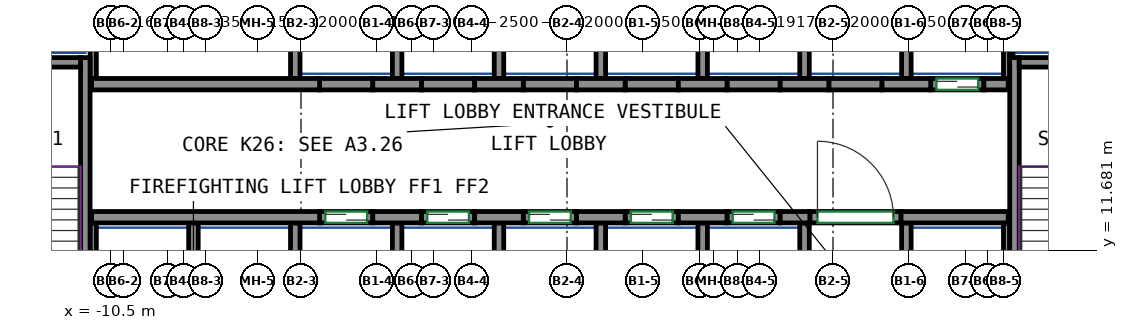
"""IFC4 building model, lengths in metres.
Left out: names, types, materials, properties, quantities, classifications, styles, units other than length and angle.
Written with IfcOpenShell. Run it as: python <this file> out.ifc"""

import sys

from ifc_helpers import new_model, si_unit, direction, frame, frame_2d, origin, place, context, subcontext, project, spatial, rectangle, extrude, source, transform, mapped, element, fill, save


model = new_model("IFC4")
c1 = context("Model", 3, precision=1e-05, world=origin(), true_north=direction((0.0, 1.0)))
c2 = subcontext(c1, "Body", "Model", "MODEL_VIEW")
j1 = project(units=[si_unit("LENGTHUNIT", "METRE"), si_unit("PLANEANGLEUNIT", "RADIAN")], contexts=[c1])
p1 = place(None, origin())
s1 = spatial("IfcSite", under=j1, at=p1, CompositionType="ELEMENT")
p2 = place(p1, origin())
s2 = spatial("IfcBuilding", under=s1, at=p2, CompositionType="ELEMENT")
p3 = place(p2, frame((0.0, 0.0, 108.6)))
s3 = spatial("IfcBuildingStorey", under=s2, at=p3, CompositionType="ELEMENT", Elevation=108.6)
m1 = source(origin(), c2, "Body", "SweptSolid", [
    extrude(rectangle(XDim=7.75, YDim=0.25, at=frame_2d((3.875, 0.0))), origin(), (0.0, 0.0, 1.0), 3.72),
])
p4 = place(p3, frame((-11.175, 9.0, 0.0), z_axis=(0.0, 0.0, 1.0), x_axis=(0.0, 1.0, 0.0)))
e1 = element("IfcWall", 1, at=p4, inside=s3, PredefinedType="SHEAR", context=c2, shape_type="MappedRepresentation", body=[
    mapped(m1, transform((0.0, 0.0, 0.0))),
])
m2 = source(origin(), c2, "Body", "SweptSolid", [
    extrude(rectangle(XDim=3.7, YDim=0.25, at=frame_2d((1.85, 0.0))), origin(), (0.0, 0.0, 1.0), 3.72),
])
p5 = place(p3, frame((-15.0, 16.625, 0.0), z_axis=(0.0, 0.0, 1.0), x_axis=(1.0, 0.0, 0.0)))
e2 = element("IfcWall", 2, at=p5, inside=s3, PredefinedType="SHEAR", context=c2, shape_type="MappedRepresentation", body=[
    mapped(m2, transform((0.0, 0.0, 0.0))),
])
p6 = place(p3, frame((13.275, 9.0, 0.0), z_axis=(0.0, 0.0, 1.0), x_axis=(0.0, 1.0, 0.0)))
e3 = element("IfcWall", 3, at=p6, inside=s3, PredefinedType="SHEAR", context=c2, shape_type="MappedRepresentation", body=[
    mapped(m1, transform((0.0, 0.0, 0.0))),
])
m3 = source(origin(), c2, "Body", "SweptSolid", [
    extrude(rectangle(XDim=3.7, YDim=0.25, at=frame_2d((1.85, 0.0))), origin(), (0.0, 0.0, 1.0), 3.72),
])
p7 = place(p3, frame((13.4, 16.625, 0.0), z_axis=(0.0, 0.0, 1.0), x_axis=(1.0, 0.0, 0.0)))
e4 = element("IfcWall", 4, at=p7, inside=s3, PredefinedType="SHEAR", context=c2, shape_type="MappedRepresentation", body=[
    mapped(m3, transform((0.0, 0.0, 0.0))),
])
m4 = source(origin(), c2, "Body", "SweptSolid", [
    extrude(rectangle(XDim=6.0, YDim=0.3, at=frame_2d((3.0, 0.0))), origin(), (0.0, 0.0, 1.0), 3.72),
])
p8 = place(p3, frame((-11.01, 12.55, 0.0), z_axis=(0.0, 0.0, 1.0), x_axis=(1.0, 0.0, 0.0)))
e5 = element("IfcWall", 5, at=p8, inside=s3, PredefinedType="SHEAR", context=c2, shape_type="MappedRepresentation", body=[
    mapped(m4, transform((0.0, 0.0, 0.0))),
])
m5 = source(origin(), c2, "Body", "SweptSolid", [
    extrude(rectangle(XDim=1.28, YDim=0.3, at=frame_2d((0.64, 0.0))), origin(), (0.0, 0.0, 1.0), 3.72),
])
for number, where, z_axis, x_axis in (
    (6, (-3.61, 12.55, 0.0), (0.0, 0.0, 1.0), (1.0, 0.0, 0.0)),
    (7, (-0.93, 12.55, 0.0), (0.0, 0.0, 1.0), (1.0, 0.0, 0.0)),
    (8, (1.75, 12.55, 0.0), (0.0, 0.0, 1.0), (1.0, 0.0, 0.0)),
    (9, (4.43, 12.55, 0.0), (0.0, 0.0, 1.0), (1.0, 0.0, 0.0)),
):
    element("IfcWall", number, at=place(p3, frame(where, z_axis=z_axis, x_axis=x_axis)), inside=s3, PredefinedType="SHEAR", context=c2, shape_type="MappedRepresentation", body=[
        mapped(m5, transform((0.0, 0.0, 0.0))),
    ])
m6 = source(origin(), c2, "Body", "SweptSolid", [
    extrude(rectangle(XDim=0.78, YDim=0.3, at=frame_2d((0.39, 0.0))), origin(), (0.0, 0.0, 1.0), 3.72),
])
p9 = place(p3, frame((7.11, 12.55, 0.0), z_axis=(0.0, 0.0, 1.0), x_axis=(1.0, 0.0, 0.0)))
e10 = element("IfcWall", 10, at=p9, inside=s3, PredefinedType="SHEAR", context=c2, shape_type="MappedRepresentation", body=[
    mapped(m6, transform((0.0, 0.0, 0.0))),
])
m7 = source(origin(), c2, "Body", "SweptSolid", [
    extrude(rectangle(XDim=2.82, YDim=0.3, at=frame_2d((1.41, 0.0))), origin(), (0.0, 0.0, 1.0), 3.72),
])
p10 = place(p3, frame((10.29, 12.55, 0.0), z_axis=(0.0, 0.0, 1.0), x_axis=(1.0, 0.0, 0.0)))
e11 = element("IfcWall", 11, at=p10, inside=s3, PredefinedType="SHEAR", context=c2, shape_type="MappedRepresentation", body=[
    mapped(m7, transform((0.0, 0.0, 0.0))),
])
p11 = place(p3, frame((-11.01, 16.05, 0.0), z_axis=(0.0, 0.0, 1.0), x_axis=(1.0, 0.0, 0.0)))
e12 = element("IfcWall", 12, at=p11, inside=s3, PredefinedType="SHEAR", context=c2, shape_type="MappedRepresentation", body=[
    mapped(m4, transform((0.0, 0.0, 0.0))),
])
for number, where, z_axis, x_axis in (
    (13, (-3.61, 16.05, 0.0), (0.0, 0.0, 1.0), (1.0, 0.0, 0.0)),
    (14, (-0.93, 16.05, 0.0), (0.0, 0.0, 1.0), (1.0, 0.0, 0.0)),
    (15, (1.75, 16.05, 0.0), (0.0, 0.0, 1.0), (1.0, 0.0, 0.0)),
    (16, (4.43, 16.05, 0.0), (0.0, 0.0, 1.0), (1.0, 0.0, 0.0)),
):
    element("IfcWall", number, at=place(p3, frame(where, z_axis=z_axis, x_axis=x_axis)), inside=s3, PredefinedType="SHEAR", context=c2, shape_type="MappedRepresentation", body=[
        mapped(m5, transform((0.0, 0.0, 0.0))),
    ])
m8 = source(origin(), c2, "Body", "SweptSolid", [
    extrude(rectangle(XDim=1.28, YDim=0.3, at=frame_2d((0.64, 0.0))), origin(), (0.0, 0.0, 1.0), 3.72),
])
p12 = place(p3, frame((7.11, 16.05, 0.0), z_axis=(0.0, 0.0, 1.0), x_axis=(1.0, 0.0, 0.0)))
e17 = element("IfcWall", 17, at=p12, inside=s3, PredefinedType="SHEAR", context=c2, shape_type="MappedRepresentation", body=[
    mapped(m8, transform((0.0, 0.0, 0.0))),
])
p13 = place(p3, frame((9.79, 16.05, 0.0), z_axis=(0.0, 0.0, 1.0), x_axis=(1.0, 0.0, 0.0)))
e18 = element("IfcWall", 18, at=p13, inside=s3, PredefinedType="SHEAR", context=c2, shape_type="MappedRepresentation", body=[
    mapped(m5, transform((0.0, 0.0, 0.0))),
])
m9 = source(origin(), c2, "Body", "SweptSolid", [
    extrude(rectangle(XDim=0.64, YDim=0.3, at=frame_2d((0.32, 0.0))), origin(), (0.0, 0.0, 1.0), 3.72),
])
p14 = place(p3, frame((12.47, 16.05, 0.0), z_axis=(0.0, 0.0, 1.0), x_axis=(1.0, 0.0, 0.0)))
e19 = element("IfcWall", 19, at=p14, inside=s3, PredefinedType="SHEAR", context=c2, shape_type="MappedRepresentation", body=[
    mapped(m9, transform((0.0, 0.0, 0.0))),
])
m10 = source(origin(), c2, "Body", "SweptSolid", [
    extrude(rectangle(XDim=1.4, YDim=0.3, at=frame_2d((0.7, 0.0))), origin(), (0.0, 0.0, 1.0), 3.72),
])
p15 = place(p3, frame((-5.01, 12.55, 0.0), z_axis=(0.0, 0.0, 1.0), x_axis=(1.0, 0.0, 0.0)))
e20 = element("IfcWall", 20, at=p15, inside=s3, PredefinedType="PARTITIONING", context=c2, shape_type="MappedRepresentation", body=[
    mapped(m10, transform((0.0, 0.0, 0.0))),
])
p16 = place(p15, frame((0.15, 0.0, 0.0)))
e21 = element("IfcOpeningElement", 21, at=p16, cuts=e20, PredefinedType="OPENING", context=c2, shape_type="SweptSolid", body=[
    extrude(rectangle(XDim=1.1, YDim=2.1, at=frame_2d((0.55, 1.05))), frame((0.0, 0.16, 0.0), z_axis=(0.0, -1.0, 0.0), x_axis=(1.0, 0.0, 0.0)), (0.0, 0.0, 1.0), 0.32),
])
m11 = source(origin(), c2, "Body", "SweptSolid", [
    extrude(rectangle(XDim=1.4, YDim=0.3, at=frame_2d((0.7, 0.0))), origin(), (0.0, 0.0, 1.0), 3.72),
])
p17 = place(p3, frame((-2.33, 12.55, 0.0), z_axis=(0.0, 0.0, 1.0), x_axis=(1.0, 0.0, 0.0)))
e22 = element("IfcWall", 22, at=p17, inside=s3, PredefinedType="PARTITIONING", context=c2, shape_type="MappedRepresentation", body=[
    mapped(m11, transform((0.0, 0.0, 0.0))),
])
p18 = place(p17, frame((0.15, 0.0, 0.0)))
e23 = element("IfcOpeningElement", 23, at=p18, cuts=e22, PredefinedType="OPENING", context=c2, shape_type="SweptSolid", body=[
    extrude(rectangle(XDim=1.1, YDim=2.1, at=frame_2d((0.55, 1.05))), frame((0.0, 0.16, 0.0), z_axis=(0.0, -1.0, 0.0), x_axis=(1.0, 0.0, 0.0)), (0.0, 0.0, 1.0), 0.32),
])
p19 = place(p3, frame((0.35, 12.55, 0.0), z_axis=(0.0, 0.0, 1.0), x_axis=(1.0, 0.0, 0.0)))
e24 = element("IfcWall", 24, at=p19, inside=s3, PredefinedType="PARTITIONING", context=c2, shape_type="MappedRepresentation", body=[
    mapped(m10, transform((0.0, 0.0, 0.0))),
])
p20 = place(p19, frame((0.15, 0.0, 0.0)))
e25 = element("IfcOpeningElement", 25, at=p20, cuts=e24, PredefinedType="OPENING", context=c2, shape_type="SweptSolid", body=[
    extrude(rectangle(XDim=1.1, YDim=2.1, at=frame_2d((0.55, 1.05))), frame((0.0, 0.16, 0.0), z_axis=(0.0, -1.0, 0.0), x_axis=(1.0, 0.0, 0.0)), (0.0, 0.0, 1.0), 0.32),
])
p21 = place(p3, frame((3.03, 12.55, 0.0), z_axis=(0.0, 0.0, 1.0), x_axis=(1.0, 0.0, 0.0)))
e26 = element("IfcWall", 26, at=p21, inside=s3, PredefinedType="PARTITIONING", context=c2, shape_type="MappedRepresentation", body=[
    mapped(m10, transform((0.0, 0.0, 0.0))),
])
p22 = place(p21, frame((0.15, 0.0, 0.0)))
e27 = element("IfcOpeningElement", 27, at=p22, cuts=e26, PredefinedType="OPENING", context=c2, shape_type="SweptSolid", body=[
    extrude(rectangle(XDim=1.1, YDim=2.1, at=frame_2d((0.55, 1.05))), frame((0.0, 0.16, 0.0), z_axis=(0.0, -1.0, 0.0), x_axis=(1.0, 0.0, 0.0)), (0.0, 0.0, 1.0), 0.32),
])
p23 = place(p3, frame((5.71, 12.55, 0.0), z_axis=(0.0, 0.0, 1.0), x_axis=(1.0, 0.0, 0.0)))
e28 = element("IfcWall", 28, at=p23, inside=s3, PredefinedType="PARTITIONING", context=c2, shape_type="MappedRepresentation", body=[
    mapped(m11, transform((0.0, 0.0, 0.0))),
])
p24 = place(p23, frame((0.15, 0.0, 0.0)))
e29 = element("IfcOpeningElement", 29, at=p24, cuts=e28, PredefinedType="OPENING", context=c2, shape_type="SweptSolid", body=[
    extrude(rectangle(XDim=1.1, YDim=2.1, at=frame_2d((0.55, 1.05))), frame((0.0, 0.16, 0.0), z_axis=(0.0, -1.0, 0.0), x_axis=(1.0, 0.0, 0.0)), (0.0, 0.0, 1.0), 0.32),
])
p25 = place(p3, frame((11.07, 16.05, 0.0), z_axis=(0.0, 0.0, 1.0), x_axis=(1.0, 0.0, 0.0)))
e30 = element("IfcWall", 30, at=p25, inside=s3, PredefinedType="PARTITIONING", context=c2, shape_type="MappedRepresentation", body=[
    mapped(m10, transform((0.0, 0.0, 0.0))),
])
p26 = place(p25, frame((0.15, 0.0, 0.0)))
e31 = element("IfcOpeningElement", 31, at=p26, cuts=e30, PredefinedType="OPENING", context=c2, shape_type="SweptSolid", body=[
    extrude(rectangle(XDim=1.1, YDim=2.1, at=frame_2d((0.55, 1.05))), frame((0.0, 0.16, 0.0), z_axis=(0.0, -1.0, 0.0), x_axis=(1.0, 0.0, 0.0)), (0.0, 0.0, 1.0), 0.32),
])
m12 = source(origin(), c2, "Body", "SweptSolid", [
    extrude(rectangle(XDim=2.4, YDim=0.3, at=frame_2d((1.2, 0.0))), origin(), (0.0, 0.0, 1.0), 3.72),
])
p27 = place(p3, frame((7.89, 12.55, 0.0), z_axis=(0.0, 0.0, 1.0), x_axis=(1.0, 0.0, 0.0)))
e32 = element("IfcWall", 32, at=p27, inside=s3, PredefinedType="PARTITIONING", context=c2, shape_type="MappedRepresentation", body=[
    mapped(m12, transform((0.0, 0.0, 0.0))),
])
p28 = place(p27, frame((0.2, 0.0, 0.0)))
e33 = element("IfcOpeningElement", 33, at=p28, cuts=e32, PredefinedType="OPENING", context=c2, shape_type="SweptSolid", body=[
    extrude(rectangle(XDim=2.0, YDim=2.1, at=frame_2d((1.0, 1.05))), frame((0.0, 0.16, 0.0), z_axis=(0.0, -1.0, 0.0), x_axis=(1.0, 0.0, 0.0)), (0.0, 0.0, 1.0), 0.32),
])
p29 = place(p3, frame((-5.01, 16.05, 0.0), z_axis=(0.0, 0.0, 1.0), x_axis=(1.0, 0.0, 0.0)))
e34 = element("IfcWall", 34, at=p29, inside=s3, PredefinedType="PARTITIONING", context=c2, shape_type="MappedRepresentation", body=[
    mapped(m10, transform((0.0, 0.0, 0.0))),
])
p30 = place(p3, frame((-2.33, 16.05, 0.0), z_axis=(0.0, 0.0, 1.0), x_axis=(1.0, 0.0, 0.0)))
e35 = element("IfcWall", 35, at=p30, inside=s3, PredefinedType="PARTITIONING", context=c2, shape_type="MappedRepresentation", body=[
    mapped(m11, transform((0.0, 0.0, 0.0))),
])
for number, where, z_axis, x_axis in (
    (36, (0.35, 16.05, 0.0), (0.0, 0.0, 1.0), (1.0, 0.0, 0.0)),
    (37, (3.03, 16.05, 0.0), (0.0, 0.0, 1.0), (1.0, 0.0, 0.0)),
):
    element("IfcWall", number, at=place(p3, frame(where, z_axis=z_axis, x_axis=x_axis)), inside=s3, PredefinedType="PARTITIONING", context=c2, shape_type="MappedRepresentation", body=[
        mapped(m10, transform((0.0, 0.0, 0.0))),
    ])
for number, where, z_axis, x_axis in (
    (38, (5.71, 16.05, 0.0), (0.0, 0.0, 1.0), (1.0, 0.0, 0.0)),
    (39, (8.39, 16.05, 0.0), (0.0, 0.0, 1.0), (1.0, 0.0, 0.0)),
):
    element("IfcWall", number, at=place(p3, frame(where, z_axis=z_axis, x_axis=x_axis)), inside=s3, PredefinedType="PARTITIONING", context=c2, shape_type="MappedRepresentation", body=[
        mapped(m11, transform((0.0, 0.0, 0.0))),
    ])
m13 = source(origin(), c2, "Body", "SweptSolid", [
    extrude(rectangle(XDim=3.275, YDim=0.165, at=frame_2d((1.638, 0.0))), origin(), (0.0, 0.0, 1.0), 3.72),
])
p31 = place(p3, frame((13.067, 16.2, 0.0), z_axis=(0.0, 0.0, 1.0), x_axis=(0.0, 1.0, 0.0)))
e40 = element("IfcWall", 40, at=p31, inside=s3, PredefinedType="PARTITIONING", context=c2, shape_type="MappedRepresentation", body=[
    mapped(m13, transform((0.0, 0.0, 0.0))),
])
m14 = source(origin(), c2, "Body", "SweptSolid", [
    extrude(rectangle(XDim=4.8, YDim=0.165, at=frame_2d((2.4, 0.0))), origin(), (0.0, 0.0, 1.0), 3.72),
])
p32 = place(p3, frame((-10.968, 16.2, 0.0), z_axis=(0.0, 0.0, 1.0), x_axis=(0.0, 1.0, 0.0)))
e41 = element("IfcWall", 41, at=p32, inside=s3, PredefinedType="PARTITIONING", context=c2, shape_type="MappedRepresentation", body=[
    mapped(m14, transform((0.0, 0.0, 0.0))),
])
m15 = source(origin(), c2, "Body", "SweptSolid", [
    extrude(rectangle(XDim=3.275, YDim=0.25, at=frame_2d((1.638, 0.0))), origin(), (0.0, 0.0, 1.0), 3.72),
])
p33 = place(p3, frame((10.43, 16.2, 0.0), z_axis=(0.0, 0.0, 1.0), x_axis=(0.0, 1.0, 0.0)))
e42 = element("IfcWall", 42, at=p33, inside=s3, PredefinedType="PARTITIONING", context=c2, shape_type="MappedRepresentation", body=[
    mapped(m15, transform((0.0, 0.0, 0.0))),
])
m16 = source(origin(), c2, "Body", "SweptSolid", [
    extrude(rectangle(XDim=2.725, YDim=0.085, at=frame_2d((1.363, 0.0))), origin(), (0.0, 0.0, 1.0), 3.72),
])
p34 = place(p3, frame((13.192, 16.75, 0.0), z_axis=(0.0, 0.0, 1.0), x_axis=(0.0, 1.0, 0.0)))
e43 = element("IfcWall", 43, at=p34, inside=s3, PredefinedType="PARTITIONING", context=c2, shape_type="MappedRepresentation", body=[
    mapped(m16, transform((0.0, 0.0, 0.0))),
])
for number, where, z_axis, x_axis in (
    (44, (2.39, 16.2, 0.0), (0.0, 0.0, 1.0), (0.0, 1.0, 0.0)),
    (45, (5.07, 16.2, 0.0), (0.0, 0.0, 1.0), (0.0, 1.0, 0.0)),
    (46, (7.75, 16.2, 0.0), (0.0, 0.0, 1.0), (0.0, 1.0, 0.0)),
    (47, (-0.29, 16.2, 0.0), (0.0, 0.0, 1.0), (0.0, 1.0, 0.0)),
    (48, (-2.97, 16.2, 0.0), (0.0, 0.0, 1.0), (0.0, 1.0, 0.0)),
    (49, (-5.65, 16.2, 0.0), (0.0, 0.0, 1.0), (0.0, 1.0, 0.0)),
):
    element("IfcWall", number, at=place(p3, frame(where, z_axis=z_axis, x_axis=x_axis)), inside=s3, PredefinedType="PARTITIONING", context=c2, shape_type="MappedRepresentation", body=[
        mapped(m15, transform((0.0, 0.0, 0.0))),
    ])
m17 = source(origin(), c2, "Body", "SweptSolid", [
    extrude(rectangle(XDim=3.4, YDim=0.25, at=frame_2d((1.7, 0.0))), origin(), (0.0, 0.0, 1.0), 3.72),
])
p35 = place(p3, frame((10.43, 9.0, 0.0), z_axis=(0.0, 0.0, 1.0), x_axis=(0.0, 1.0, 0.0)))
e50 = element("IfcWall", 50, at=p35, inside=s3, PredefinedType="PARTITIONING", context=c2, shape_type="MappedRepresentation", body=[
    mapped(m17, transform((0.0, 0.0, 0.0))),
])
m18 = source(origin(), c2, "Body", "SweptSolid", [
    extrude(rectangle(XDim=3.4, YDim=0.165, at=frame_2d((1.7, 0.0))), origin(), (0.0, 0.0, 1.0), 3.72),
])
p36 = place(p3, frame((13.067, 9.0, 0.0), z_axis=(0.0, 0.0, 1.0), x_axis=(0.0, 1.0, 0.0)))
e51 = element("IfcWall", 51, at=p36, inside=s3, PredefinedType="PARTITIONING", context=c2, shape_type="MappedRepresentation", body=[
    mapped(m18, transform((0.0, 0.0, 0.0))),
])
for number, where, z_axis, x_axis in (
    (52, (2.39, 9.0, 0.0), (0.0, 0.0, 1.0), (0.0, 1.0, 0.0)),
    (53, (5.07, 9.0, 0.0), (0.0, 0.0, 1.0), (0.0, 1.0, 0.0)),
    (54, (7.75, 9.0, 0.0), (0.0, 0.0, 1.0), (0.0, 1.0, 0.0)),
    (55, (-0.29, 9.0, 0.0), (0.0, 0.0, 1.0), (0.0, 1.0, 0.0)),
):
    element("IfcWall", number, at=place(p3, frame(where, z_axis=z_axis, x_axis=x_axis)), inside=s3, PredefinedType="PARTITIONING", context=c2, shape_type="MappedRepresentation", body=[
        mapped(m17, transform((0.0, 0.0, 0.0))),
    ])
p37 = place(p3, frame((-10.968, 9.0, 0.0), z_axis=(0.0, 0.0, 1.0), x_axis=(0.0, 1.0, 0.0)))
e56 = element("IfcWall", 56, at=p37, inside=s3, PredefinedType="PARTITIONING", context=c2, shape_type="MappedRepresentation", body=[
    mapped(m18, transform((0.0, 0.0, 0.0))),
])
for number, where, z_axis, x_axis in (
    (57, (-2.97, 9.0, 0.0), (0.0, 0.0, 1.0), (0.0, 1.0, 0.0)),
    (58, (-5.65, 9.0, 0.0), (0.0, 0.0, 1.0), (0.0, 1.0, 0.0)),
    (59, (-8.33, 9.0, 0.0), (0.0, 0.0, 1.0), (0.0, 1.0, 0.0)),
):
    element("IfcWall", number, at=place(p3, frame(where, z_axis=z_axis, x_axis=x_axis)), inside=s3, PredefinedType="PARTITIONING", context=c2, shape_type="MappedRepresentation", body=[
        mapped(m17, transform((0.0, 0.0, 0.0))),
    ])
p38 = place(p28, origin())
e60 = element("IfcDoor", 60, at=p38, inside=s3, OperationType="DOUBLE_DOOR_SINGLE_SWING", PredefinedType="DOOR", context=c2, shape_type="SweptSolid", body=[
    extrude(rectangle(XDim=2.0, YDim=2.1, at=frame_2d((1.0, 1.05))), frame((0.0, 0.025, 0.0), z_axis=(0.0, -1.0, 0.0), x_axis=(1.0, 0.0, 0.0)), (0.0, 0.0, 1.0), 0.05),
])
fill(e33, e60)
p39 = place(p16, origin())
e61 = element("IfcDoor", 61, at=p39, inside=s3, OperationType="DOUBLE_DOOR_SLIDING", PredefinedType="DOOR", context=c2, shape_type="SweptSolid", body=[
    extrude(rectangle(XDim=1.1, YDim=2.1, at=frame_2d((0.55, 1.05))), frame((0.0, 0.025, 0.0), z_axis=(0.0, -1.0, 0.0), x_axis=(1.0, 0.0, 0.0)), (0.0, 0.0, 1.0), 0.05),
])
fill(e21, e61)
p40 = place(p18, origin())
e62 = element("IfcDoor", 62, at=p40, inside=s3, OperationType="DOUBLE_DOOR_SLIDING", PredefinedType="DOOR", context=c2, shape_type="SweptSolid", body=[
    extrude(rectangle(XDim=1.1, YDim=2.1, at=frame_2d((0.55, 1.05))), frame((0.0, 0.025, 0.0), z_axis=(0.0, -1.0, 0.0), x_axis=(1.0, 0.0, 0.0)), (0.0, 0.0, 1.0), 0.05),
])
fill(e23, e62)
p41 = place(p20, origin())
e63 = element("IfcDoor", 63, at=p41, inside=s3, OperationType="DOUBLE_DOOR_SLIDING", PredefinedType="DOOR", context=c2, shape_type="SweptSolid", body=[
    extrude(rectangle(XDim=1.1, YDim=2.1, at=frame_2d((0.55, 1.05))), frame((0.0, 0.025, 0.0), z_axis=(0.0, -1.0, 0.0), x_axis=(1.0, 0.0, 0.0)), (0.0, 0.0, 1.0), 0.05),
])
fill(e25, e63)
p42 = place(p22, origin())
e64 = element("IfcDoor", 64, at=p42, inside=s3, OperationType="DOUBLE_DOOR_SLIDING", PredefinedType="DOOR", context=c2, shape_type="SweptSolid", body=[
    extrude(rectangle(XDim=1.1, YDim=2.1, at=frame_2d((0.55, 1.05))), frame((0.0, 0.025, 0.0), z_axis=(0.0, -1.0, 0.0), x_axis=(1.0, 0.0, 0.0)), (0.0, 0.0, 1.0), 0.05),
])
fill(e27, e64)
p43 = place(p24, origin())
e65 = element("IfcDoor", 65, at=p43, inside=s3, OperationType="DOUBLE_DOOR_SLIDING", PredefinedType="DOOR", context=c2, shape_type="SweptSolid", body=[
    extrude(rectangle(XDim=1.1, YDim=2.1, at=frame_2d((0.55, 1.05))), frame((0.0, 0.025, 0.0), z_axis=(0.0, -1.0, 0.0), x_axis=(1.0, 0.0, 0.0)), (0.0, 0.0, 1.0), 0.05),
])
fill(e29, e65)
p44 = place(p26, origin())
e66 = element("IfcDoor", 66, at=p44, inside=s3, OperationType="DOUBLE_DOOR_SLIDING", PredefinedType="DOOR", context=c2, shape_type="SweptSolid", body=[
    extrude(rectangle(XDim=1.1, YDim=2.1, at=frame_2d((0.55, 1.05))), frame((0.0, 0.025, 0.0), z_axis=(0.0, -1.0, 0.0), x_axis=(1.0, 0.0, 0.0)), (0.0, 0.0, 1.0), 0.05),
])
fill(e31, e66)
save(model, sys.argv[1])
